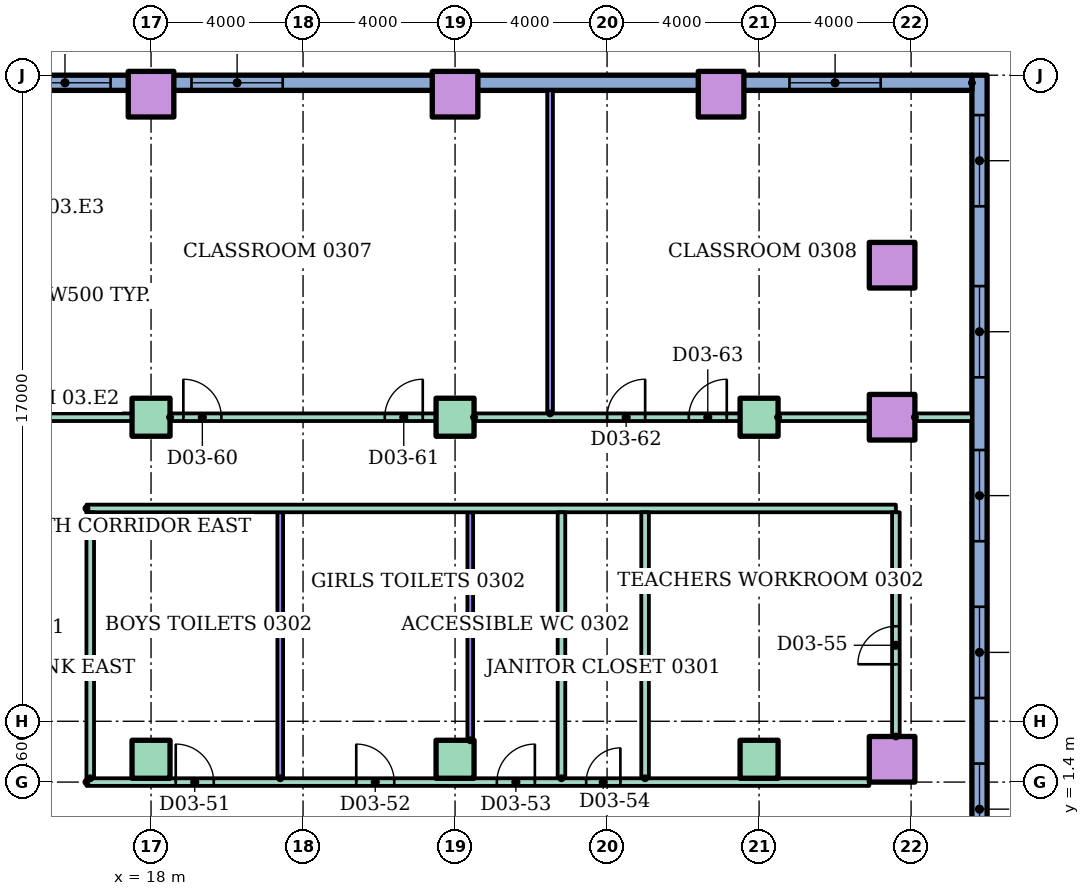
"""IFC4 building model, lengths in metres.
Left out: names, types, materials, properties, quantities, classifications, styles, units other than length and angle.
Written with IfcOpenShell. Run it as: python <this file> out.ifc"""

import sys

from ifc_helpers import new_model, si_unit, direction, frame, frame_2d, origin, origin_2d, place, context, subcontext, project, spatial, rectangle, hollow_rectangle, extrude, element, fill, save


model = new_model("IFC4")
c1 = context("Model", 3, precision=1e-05, world=origin(), true_north=direction((0.0, 1.0)))
c2 = subcontext(c1, "Body", "Model", "MODEL_VIEW")
j1 = project(units=[si_unit("LENGTHUNIT", "METRE"), si_unit("PLANEANGLEUNIT", "RADIAN")], contexts=[c1])
p1 = place(None, origin())
s1 = spatial("IfcSite", under=j1, at=p1, CompositionType="ELEMENT")
p2 = place(p1, origin())
s2 = spatial("IfcBuilding", under=s1, at=p2, CompositionType="ELEMENT")
p3 = place(p2, frame((0.0, 0.0, 14.0)))
s3 = spatial("IfcBuildingStorey", under=s2, at=p3, CompositionType="ELEMENT", Elevation=14.0)
for number, where in (
    (1, (18.0, 2.0, 0.0)),
    (2, (26.0, 2.0, 0.0)),
    (3, (34.0, 2.0, 0.0)),
):
    element("IfcColumn", number, at=place(p3, frame(where)), inside=s3, PredefinedType="COLUMN", context=c2, shape_type="SweptSolid", body=[
        extrude(rectangle(XDim=1.0, YDim=1.0, at=origin_2d()), origin(), (0.0, 0.0, 1.0), 4.0),
    ])
p4 = place(p3, frame((37.5, 2.0, 0.0)))
e4 = element("IfcColumn", 4, at=p4, inside=s3, PredefinedType="COLUMN", context=c2, shape_type="SweptSolid", body=[
    extrude(hollow_rectangle(XDim=1.2, YDim=1.2, WallThickness=0.06, at=origin_2d()), origin(), (0.0, 0.0, 1.0), 4.0),
])
for number, where in (
    (5, (18.0, 11.0, 0.0)),
    (6, (26.0, 11.0, 0.0)),
    (7, (34.0, 11.0, 0.0)),
):
    element("IfcColumn", number, at=place(p3, frame(where)), inside=s3, PredefinedType="COLUMN", context=c2, shape_type="SweptSolid", body=[
        extrude(rectangle(XDim=1.0, YDim=1.0, at=origin_2d()), origin(), (0.0, 0.0, 1.0), 4.0),
    ])
for number, where in (
    (8, (37.5, 11.0, 0.0)),
    (9, (37.5, 15.0, 0.0)),
    (10, (18.0, 19.5, 0.0)),
    (11, (26.0, 19.5, 0.0)),
    (12, (33.0, 19.5, 0.0)),
):
    element("IfcColumn", number, at=place(p3, frame(where)), inside=s3, PredefinedType="COLUMN", context=c2, shape_type="SweptSolid", body=[
        extrude(hollow_rectangle(XDim=1.2, YDim=1.2, WallThickness=0.06, at=origin_2d()), origin(), (0.0, 0.0, 1.0), 4.0),
    ])
p5 = place(p3, frame((39.8, -50.0, 0.0), z_axis=(0.0, 0.0, 1.0), x_axis=(0.0, 1.0, 0.0)))
e13 = element("IfcWall", 13, at=p5, inside=s3, PredefinedType="STANDARD", context=c2, shape_type="SweptSolid", body=[
    extrude(rectangle(XDim=70.0, YDim=0.4, at=frame_2d((35.0, 0.0))), origin(), (0.0, 0.0, 1.0), 3.7),
])
p6 = place(p5, frame((0.75, 0.0, 0.9)))
e14 = element("IfcOpeningElement", 14, at=p6, cuts=e13, PredefinedType="OPENING", context=c2, shape_type="SweptSolid", body=[
    extrude(rectangle(XDim=2.4, YDim=2.1, at=frame_2d((1.2, 1.05))), frame((0.0, 0.21, 0.0), z_axis=(0.0, -1.0, 0.0), x_axis=(1.0, 0.0, 0.0)), (0.0, 0.0, 1.0), 0.42),
])
p7 = place(p5, frame((28.863, 0.0, 0.9)))
e15 = element("IfcOpeningElement", 15, at=p7, cuts=e13, PredefinedType="OPENING", context=c2, shape_type="SweptSolid", body=[
    extrude(rectangle(XDim=2.4, YDim=2.1, at=frame_2d((1.2, 1.05))), frame((0.0, 0.21, 0.0), z_axis=(0.0, -1.0, 0.0), x_axis=(1.0, 0.0, 0.0)), (0.0, 0.0, 1.0), 0.42),
])
p8 = place(p5, frame((32.988, 0.0, 0.9)))
e16 = element("IfcOpeningElement", 16, at=p8, cuts=e13, PredefinedType="OPENING", context=c2, shape_type="SweptSolid", body=[
    extrude(rectangle(XDim=2.4, YDim=2.1, at=frame_2d((1.2, 1.05))), frame((0.0, 0.21, 0.0), z_axis=(0.0, -1.0, 0.0), x_axis=(1.0, 0.0, 0.0)), (0.0, 0.0, 1.0), 0.42),
])
p9 = place(p5, frame((37.113, 0.0, 0.9)))
e17 = element("IfcOpeningElement", 17, at=p9, cuts=e13, PredefinedType="OPENING", context=c2, shape_type="SweptSolid", body=[
    extrude(rectangle(XDim=2.4, YDim=2.1, at=frame_2d((1.2, 1.05))), frame((0.0, 0.21, 0.0), z_axis=(0.0, -1.0, 0.0), x_axis=(1.0, 0.0, 0.0)), (0.0, 0.0, 1.0), 0.42),
])
p10 = place(p5, frame((41.238, 0.0, 0.9)))
e18 = element("IfcOpeningElement", 18, at=p10, cuts=e13, PredefinedType="OPENING", context=c2, shape_type="SweptSolid", body=[
    extrude(rectangle(XDim=2.4, YDim=2.1, at=frame_2d((1.2, 1.05))), frame((0.0, 0.21, 0.0), z_axis=(0.0, -1.0, 0.0), x_axis=(1.0, 0.0, 0.0)), (0.0, 0.0, 1.0), 0.42),
])
p11 = place(p5, frame((45.363, 0.0, 0.9)))
e19 = element("IfcOpeningElement", 19, at=p11, cuts=e13, PredefinedType="OPENING", context=c2, shape_type="SweptSolid", body=[
    extrude(rectangle(XDim=2.4, YDim=2.1, at=frame_2d((1.2, 1.05))), frame((0.0, 0.21, 0.0), z_axis=(0.0, -1.0, 0.0), x_axis=(1.0, 0.0, 0.0)), (0.0, 0.0, 1.0), 0.42),
])
p12 = place(p5, frame((49.488, 0.0, 0.9)))
e20 = element("IfcOpeningElement", 20, at=p12, cuts=e13, PredefinedType="OPENING", context=c2, shape_type="SweptSolid", body=[
    extrude(rectangle(XDim=2.4, YDim=2.1, at=frame_2d((1.2, 1.05))), frame((0.0, 0.21, 0.0), z_axis=(0.0, -1.0, 0.0), x_axis=(1.0, 0.0, 0.0)), (0.0, 0.0, 1.0), 0.42),
])
p13 = place(p5, frame((53.613, 0.0, 0.9)))
e21 = element("IfcOpeningElement", 21, at=p13, cuts=e13, PredefinedType="OPENING", context=c2, shape_type="SweptSolid", body=[
    extrude(rectangle(XDim=2.4, YDim=2.1, at=frame_2d((1.2, 1.05))), frame((0.0, 0.21, 0.0), z_axis=(0.0, -1.0, 0.0), x_axis=(1.0, 0.0, 0.0)), (0.0, 0.0, 1.0), 0.42),
])
p14 = place(p5, frame((57.738, 0.0, 0.9)))
e22 = element("IfcOpeningElement", 22, at=p14, cuts=e13, PredefinedType="OPENING", context=c2, shape_type="SweptSolid", body=[
    extrude(rectangle(XDim=2.4, YDim=2.1, at=frame_2d((1.2, 1.05))), frame((0.0, 0.21, 0.0), z_axis=(0.0, -1.0, 0.0), x_axis=(1.0, 0.0, 0.0)), (0.0, 0.0, 1.0), 0.42),
])
p15 = place(p5, frame((62.05, 0.0, 0.9)))
e23 = element("IfcOpeningElement", 23, at=p15, cuts=e13, PredefinedType="OPENING", context=c2, shape_type="SweptSolid", body=[
    extrude(rectangle(XDim=2.4, YDim=2.1, at=frame_2d((1.2, 1.05))), frame((0.0, 0.21, 0.0), z_axis=(0.0, -1.0, 0.0), x_axis=(1.0, 0.0, 0.0)), (0.0, 0.0, 1.0), 0.42),
])
p16 = place(p5, frame((66.55, 0.0, 0.9)))
e24 = element("IfcOpeningElement", 24, at=p16, cuts=e13, PredefinedType="OPENING", context=c2, shape_type="SweptSolid", body=[
    extrude(rectangle(XDim=2.4, YDim=2.1, at=frame_2d((1.2, 1.05))), frame((0.0, 0.21, 0.0), z_axis=(0.0, -1.0, 0.0), x_axis=(1.0, 0.0, 0.0)), (0.0, 0.0, 1.0), 0.42),
])
p17 = place(p3, frame((39.6, 19.8, 0.0), z_axis=(0.0, 0.0, 1.0), x_axis=(-1.0, 0.0, 0.0)))
e25 = element("IfcWall", 25, at=p17, inside=s3, PredefinedType="STANDARD", context=c2, shape_type="SweptSolid", body=[
    extrude(rectangle(XDim=25.6, YDim=0.4, at=frame_2d((12.8, 0.0))), origin(), (0.0, 0.0, 1.0), 3.7),
])
p18 = place(p17, frame((2.4, 0.0, 0.9)))
e26 = element("IfcOpeningElement", 26, at=p18, cuts=e25, PredefinedType="OPENING", context=c2, shape_type="SweptSolid", body=[
    extrude(rectangle(XDim=2.4, YDim=2.1, at=frame_2d((1.2, 1.05))), frame((0.0, 0.21, 0.0), z_axis=(0.0, -1.0, 0.0), x_axis=(1.0, 0.0, 0.0)), (0.0, 0.0, 1.0), 0.42),
])
p19 = place(p17, frame((18.135, 0.0, 0.9)))
e27 = element("IfcOpeningElement", 27, at=p19, cuts=e25, PredefinedType="OPENING", context=c2, shape_type="SweptSolid", body=[
    extrude(rectangle(XDim=2.4, YDim=2.1, at=frame_2d((1.2, 1.05))), frame((0.0, 0.21, 0.0), z_axis=(0.0, -1.0, 0.0), x_axis=(1.0, 0.0, 0.0)), (0.0, 0.0, 1.0), 0.42),
])
p20 = place(p17, frame((22.665, 0.0, 0.9)))
e28 = element("IfcOpeningElement", 28, at=p20, cuts=e25, PredefinedType="OPENING", context=c2, shape_type="SweptSolid", body=[
    extrude(rectangle(XDim=2.4, YDim=2.1, at=frame_2d((1.2, 1.05))), frame((0.0, 0.21, 0.0), z_axis=(0.0, -1.0, 0.0), x_axis=(1.0, 0.0, 0.0)), (0.0, 0.0, 1.0), 0.42),
])
p21 = place(p3, frame((16.3, 1.4, 0.0)))
e29 = element("IfcWall", 29, at=p21, inside=s3, PredefinedType="PARTITIONING", context=c2, shape_type="SweptSolid", body=[
    extrude(rectangle(XDim=20.6, YDim=0.2, at=frame_2d((10.3, 0.0))), origin(), (0.0, 0.0, 1.0), 3.7),
])
p22 = place(p21, frame((2.35, 0.0, 0.0)))
e30 = element("IfcOpeningElement", 30, at=p22, cuts=e29, PredefinedType="OPENING", context=c2, shape_type="SweptSolid", body=[
    extrude(rectangle(XDim=1.0, YDim=2.1, at=frame_2d((0.5, 1.05))), frame((0.0, 0.11, 0.0), z_axis=(0.0, -1.0, 0.0), x_axis=(1.0, 0.0, 0.0)), (0.0, 0.0, 1.0), 0.22),
])
p23 = place(p21, frame((7.1, 0.0, 0.0)))
e31 = element("IfcOpeningElement", 31, at=p23, cuts=e29, PredefinedType="OPENING", context=c2, shape_type="SweptSolid", body=[
    extrude(rectangle(XDim=1.0, YDim=2.1, at=frame_2d((0.5, 1.05))), frame((0.0, 0.11, 0.0), z_axis=(0.0, -1.0, 0.0), x_axis=(1.0, 0.0, 0.0)), (0.0, 0.0, 1.0), 0.22),
])
p24 = place(p21, frame((10.8, 0.0, 0.0)))
e32 = element("IfcOpeningElement", 32, at=p24, cuts=e29, PredefinedType="OPENING", context=c2, shape_type="SweptSolid", body=[
    extrude(rectangle(XDim=1.0, YDim=2.1, at=frame_2d((0.5, 1.05))), frame((0.0, 0.11, 0.0), z_axis=(0.0, -1.0, 0.0), x_axis=(1.0, 0.0, 0.0)), (0.0, 0.0, 1.0), 0.22),
])
p25 = place(p21, frame((13.15, 0.0, 0.0)))
e33 = element("IfcOpeningElement", 33, at=p25, cuts=e29, PredefinedType="OPENING", context=c2, shape_type="SweptSolid", body=[
    extrude(rectangle(XDim=0.9, YDim=2.1, at=frame_2d((0.45, 1.05))), frame((0.0, 0.11, 0.0), z_axis=(0.0, -1.0, 0.0), x_axis=(1.0, 0.0, 0.0)), (0.0, 0.0, 1.0), 0.22),
])
p26 = place(p3, frame((16.3, 8.6, 0.0)))
e34 = element("IfcWall", 34, at=p26, inside=s3, PredefinedType="PARTITIONING", context=c2, shape_type="SweptSolid", body=[
    extrude(rectangle(XDim=21.3, YDim=0.2, at=frame_2d((10.65, 0.0))), origin(), (0.0, 0.0, 1.0), 3.7),
])
p27 = place(p3, frame((14.0, 11.0, 0.0)))
e35 = element("IfcWall", 35, at=p27, inside=s3, PredefinedType="PARTITIONING", context=c2, shape_type="SweptSolid", body=[
    extrude(rectangle(XDim=3.5, YDim=0.2, at=frame_2d((1.75, 0.0))), origin(), (0.0, 0.0, 1.0), 3.7),
])
p28 = place(p3, frame((18.5, 11.0, 0.0)))
e36 = element("IfcWall", 36, at=p28, inside=s3, PredefinedType="PARTITIONING", context=c2, shape_type="SweptSolid", body=[
    extrude(rectangle(XDim=7.0, YDim=0.2, at=frame_2d((3.5, 0.0))), origin(), (0.0, 0.0, 1.0), 3.7),
])
p29 = place(p28, frame((0.35, 0.0, 0.0)))
e37 = element("IfcOpeningElement", 37, at=p29, cuts=e36, PredefinedType="OPENING", context=c2, shape_type="SweptSolid", body=[
    extrude(rectangle(XDim=1.0, YDim=2.1, at=frame_2d((0.5, 1.05))), frame((0.0, 0.11, 0.0), z_axis=(0.0, -1.0, 0.0), x_axis=(1.0, 0.0, 0.0)), (0.0, 0.0, 1.0), 0.22),
])
p30 = place(p28, frame((5.65, 0.0, 0.0)))
e38 = element("IfcOpeningElement", 38, at=p30, cuts=e36, PredefinedType="OPENING", context=c2, shape_type="SweptSolid", body=[
    extrude(rectangle(XDim=1.0, YDim=2.1, at=frame_2d((0.5, 1.05))), frame((0.0, 0.11, 0.0), z_axis=(0.0, -1.0, 0.0), x_axis=(1.0, 0.0, 0.0)), (0.0, 0.0, 1.0), 0.22),
])
p31 = place(p3, frame((26.5, 11.0, 0.0)))
e39 = element("IfcWall", 39, at=p31, inside=s3, PredefinedType="PARTITIONING", context=c2, shape_type="SweptSolid", body=[
    extrude(rectangle(XDim=7.0, YDim=0.2, at=frame_2d((3.5, 0.0))), origin(), (0.0, 0.0, 1.0), 3.7),
])
p32 = place(p31, frame((3.502, 0.0, 0.0)))
e40 = element("IfcOpeningElement", 40, at=p32, cuts=e39, PredefinedType="OPENING", context=c2, shape_type="SweptSolid", body=[
    extrude(rectangle(XDim=1.0, YDim=2.1, at=frame_2d((0.5, 1.05))), frame((0.0, 0.11, 0.0), z_axis=(0.0, -1.0, 0.0), x_axis=(1.0, 0.0, 0.0)), (0.0, 0.0, 1.0), 0.22),
])
p33 = place(p31, frame((5.65, 0.0, 0.0)))
e41 = element("IfcOpeningElement", 41, at=p33, cuts=e39, PredefinedType="OPENING", context=c2, shape_type="SweptSolid", body=[
    extrude(rectangle(XDim=1.0, YDim=2.1, at=frame_2d((0.5, 1.05))), frame((0.0, 0.11, 0.0), z_axis=(0.0, -1.0, 0.0), x_axis=(1.0, 0.0, 0.0)), (0.0, 0.0, 1.0), 0.22),
])
p34 = place(p3, frame((34.5, 11.0, 0.0)))
e42 = element("IfcWall", 42, at=p34, inside=s3, PredefinedType="PARTITIONING", context=c2, shape_type="SweptSolid", body=[
    extrude(rectangle(XDim=2.4, YDim=0.2, at=frame_2d((1.2, 0.0))), origin(), (0.0, 0.0, 1.0), 3.7),
])
p35 = place(p3, frame((38.1, 11.0, 0.0)))
e43 = element("IfcWall", 43, at=p35, inside=s3, PredefinedType="PARTITIONING", context=c2, shape_type="SweptSolid", body=[
    extrude(rectangle(XDim=1.5, YDim=0.2, at=frame_2d((0.75, 0.0))), origin(), (0.0, 0.0, 1.0), 3.7),
])
p36 = place(p3, frame((16.4, 1.5, 0.0), z_axis=(0.0, 0.0, 1.0), x_axis=(0.0, 1.0, 0.0)))
e44 = element("IfcWall", 44, at=p36, inside=s3, PredefinedType="PARTITIONING", context=c2, shape_type="SweptSolid", body=[
    extrude(rectangle(XDim=7.0, YDim=0.2, at=frame_2d((3.5, 0.0))), origin(), (0.0, 0.0, 1.0), 3.7),
])
p37 = place(p3, frame((21.4, 1.5, 0.0), z_axis=(0.0, 0.0, 1.0), x_axis=(0.0, 1.0, 0.0)))
e45 = element("IfcWall", 45, at=p37, inside=s3, PredefinedType="PARTITIONING", context=c2, shape_type="SweptSolid", body=[
    extrude(rectangle(XDim=7.0, YDim=0.15, at=frame_2d((3.5, 0.0))), origin(), (0.0, 0.0, 1.0), 3.7),
])
p38 = place(p3, frame((26.4, 2.5, 0.0), z_axis=(0.0, 0.0, 1.0), x_axis=(0.0, 1.0, 0.0)))
e46 = element("IfcWall", 46, at=p38, inside=s3, PredefinedType="PARTITIONING", context=c2, shape_type="SweptSolid", body=[
    extrude(rectangle(XDim=6.0, YDim=0.15, at=frame_2d((3.0, 0.0))), origin(), (0.0, 0.0, 1.0), 3.7),
])
p39 = place(p3, frame((28.5, 11.1, 0.0), z_axis=(0.0, 0.0, 1.0), x_axis=(0.0, 1.0, 0.0)))
e47 = element("IfcWall", 47, at=p39, inside=s3, PredefinedType="PARTITIONING", context=c2, shape_type="SweptSolid", body=[
    extrude(rectangle(XDim=8.5, YDim=0.15, at=frame_2d((4.25, 0.0))), origin(), (0.0, 0.0, 1.0), 3.7),
])
for number, where, z_axis, x_axis in (
    (48, (28.8, 1.5, 0.0), (0.0, 0.0, 1.0), (0.0, 1.0, 0.0)),
    (49, (31.0, 1.5, 0.0), (0.0, 0.0, 1.0), (0.0, 1.0, 0.0)),
):
    element("IfcWall", number, at=place(p3, frame(where, z_axis=z_axis, x_axis=x_axis)), inside=s3, PredefinedType="PARTITIONING", context=c2, shape_type="SweptSolid", body=[
        extrude(rectangle(XDim=7.0, YDim=0.2, at=frame_2d((3.5, 0.0))), origin(), (0.0, 0.0, 1.0), 3.7),
    ])
p40 = place(p3, frame((37.6, 2.6, 0.0), z_axis=(0.0, 0.0, 1.0), x_axis=(0.0, 1.0, 0.0)))
e50 = element("IfcWall", 50, at=p40, inside=s3, PredefinedType="PARTITIONING", context=c2, shape_type="SweptSolid", body=[
    extrude(rectangle(XDim=5.9, YDim=0.2, at=frame_2d((2.95, 0.0))), origin(), (0.0, 0.0, 1.0), 3.7),
])
p41 = place(p40, frame((1.9, 0.0, 0.0)))
e51 = element("IfcOpeningElement", 51, at=p41, cuts=e50, PredefinedType="OPENING", context=c2, shape_type="SweptSolid", body=[
    extrude(rectangle(XDim=1.0, YDim=2.1, at=frame_2d((0.5, 1.05))), frame((0.0, 0.11, 0.0), z_axis=(0.0, -1.0, 0.0), x_axis=(1.0, 0.0, 0.0)), (0.0, 0.0, 1.0), 0.22),
])
p42 = place(p12, origin())
e52 = element("IfcWindow", 52, at=p42, inside=s3, PartitioningType="SINGLE_PANEL", PredefinedType="WINDOW", context=c2, shape_type="SweptSolid", body=[
    extrude(rectangle(XDim=2.4, YDim=2.1, at=frame_2d((1.2, 1.05))), frame((0.0, 0.03, 0.0), z_axis=(0.0, -1.0, 0.0), x_axis=(1.0, 0.0, 0.0)), (0.0, 0.0, 1.0), 0.06),
])
fill(e20, e52)
p43 = place(p13, origin())
e53 = element("IfcWindow", 53, at=p43, inside=s3, PartitioningType="SINGLE_PANEL", PredefinedType="WINDOW", context=c2, shape_type="SweptSolid", body=[
    extrude(rectangle(XDim=2.4, YDim=2.1, at=frame_2d((1.2, 1.05))), frame((0.0, 0.03, 0.0), z_axis=(0.0, -1.0, 0.0), x_axis=(1.0, 0.0, 0.0)), (0.0, 0.0, 1.0), 0.06),
])
fill(e21, e53)
p44 = place(p14, origin())
e54 = element("IfcWindow", 54, at=p44, inside=s3, PartitioningType="SINGLE_PANEL", PredefinedType="WINDOW", context=c2, shape_type="SweptSolid", body=[
    extrude(rectangle(XDim=2.4, YDim=2.1, at=frame_2d((1.2, 1.05))), frame((0.0, 0.03, 0.0), z_axis=(0.0, -1.0, 0.0), x_axis=(1.0, 0.0, 0.0)), (0.0, 0.0, 1.0), 0.06),
])
fill(e22, e54)
p45 = place(p15, origin())
e55 = element("IfcWindow", 55, at=p45, inside=s3, PartitioningType="SINGLE_PANEL", PredefinedType="WINDOW", context=c2, shape_type="SweptSolid", body=[
    extrude(rectangle(XDim=2.4, YDim=2.1, at=frame_2d((1.2, 1.05))), frame((0.0, 0.03, 0.0), z_axis=(0.0, -1.0, 0.0), x_axis=(1.0, 0.0, 0.0)), (0.0, 0.0, 1.0), 0.06),
])
fill(e23, e55)
p46 = place(p16, origin())
e56 = element("IfcWindow", 56, at=p46, inside=s3, PartitioningType="SINGLE_PANEL", PredefinedType="WINDOW", context=c2, shape_type="SweptSolid", body=[
    extrude(rectangle(XDim=2.4, YDim=2.1, at=frame_2d((1.2, 1.05))), frame((0.0, 0.03, 0.0), z_axis=(0.0, -1.0, 0.0), x_axis=(1.0, 0.0, 0.0)), (0.0, 0.0, 1.0), 0.06),
])
fill(e24, e56)
p47 = place(p18, origin())
e57 = element("IfcWindow", 57, at=p47, inside=s3, PartitioningType="SINGLE_PANEL", PredefinedType="WINDOW", context=c2, shape_type="SweptSolid", body=[
    extrude(rectangle(XDim=2.4, YDim=2.1, at=frame_2d((1.2, 1.05))), frame((0.0, 0.03, 0.0), z_axis=(0.0, -1.0, 0.0), x_axis=(1.0, 0.0, 0.0)), (0.0, 0.0, 1.0), 0.06),
])
fill(e26, e57)
p48 = place(p19, origin())
e58 = element("IfcWindow", 58, at=p48, inside=s3, PartitioningType="SINGLE_PANEL", PredefinedType="WINDOW", context=c2, shape_type="SweptSolid", body=[
    extrude(rectangle(XDim=2.4, YDim=2.1, at=frame_2d((1.2, 1.05))), frame((0.0, 0.03, 0.0), z_axis=(0.0, -1.0, 0.0), x_axis=(1.0, 0.0, 0.0)), (0.0, 0.0, 1.0), 0.06),
])
fill(e27, e58)
p49 = place(p20, origin())
e59 = element("IfcWindow", 59, at=p49, inside=s3, PartitioningType="SINGLE_PANEL", PredefinedType="WINDOW", context=c2, shape_type="SweptSolid", body=[
    extrude(rectangle(XDim=2.4, YDim=2.1, at=frame_2d((1.2, 1.05))), frame((0.0, 0.03, 0.0), z_axis=(0.0, -1.0, 0.0), x_axis=(1.0, 0.0, 0.0)), (0.0, 0.0, 1.0), 0.06),
])
fill(e28, e59)
p50 = place(p22, origin())
e60 = element("IfcDoor", 60, at=p50, inside=s3, OperationType="SINGLE_SWING_LEFT", PredefinedType="DOOR", context=c2, shape_type="SweptSolid", body=[
    extrude(rectangle(XDim=1.0, YDim=2.1, at=frame_2d((0.5, 1.05))), frame((0.0, 0.025, 0.0), z_axis=(0.0, -1.0, 0.0), x_axis=(1.0, 0.0, 0.0)), (0.0, 0.0, 1.0), 0.05),
])
fill(e30, e60)
p51 = place(p23, origin())
e61 = element("IfcDoor", 61, at=p51, inside=s3, OperationType="SINGLE_SWING_LEFT", PredefinedType="DOOR", context=c2, shape_type="SweptSolid", body=[
    extrude(rectangle(XDim=1.0, YDim=2.1, at=frame_2d((0.5, 1.05))), frame((0.0, 0.025, 0.0), z_axis=(0.0, -1.0, 0.0), x_axis=(1.0, 0.0, 0.0)), (0.0, 0.0, 1.0), 0.05),
])
fill(e31, e61)
p52 = place(p24, origin())
e62 = element("IfcDoor", 62, at=p52, inside=s3, OperationType="SINGLE_SWING_RIGHT", PredefinedType="DOOR", context=c2, shape_type="SweptSolid", body=[
    extrude(rectangle(XDim=1.0, YDim=2.1, at=frame_2d((0.5, 1.05))), frame((0.0, 0.025, 0.0), z_axis=(0.0, -1.0, 0.0), x_axis=(1.0, 0.0, 0.0)), (0.0, 0.0, 1.0), 0.05),
])
fill(e32, e62)
p53 = place(p25, origin())
e63 = element("IfcDoor", 63, at=p53, inside=s3, OperationType="SINGLE_SWING_RIGHT", PredefinedType="DOOR", context=c2, shape_type="SweptSolid", body=[
    extrude(rectangle(XDim=0.9, YDim=2.1, at=frame_2d((0.45, 1.05))), frame((0.0, 0.025, 0.0), z_axis=(0.0, -1.0, 0.0), x_axis=(1.0, 0.0, 0.0)), (0.0, 0.0, 1.0), 0.05),
])
fill(e33, e63)
p54 = place(p41, origin())
e64 = element("IfcDoor", 64, at=p54, inside=s3, OperationType="SINGLE_SWING_LEFT", PredefinedType="DOOR", context=c2, shape_type="SweptSolid", body=[
    extrude(rectangle(XDim=1.0, YDim=2.1, at=frame_2d((0.5, 1.05))), frame((0.0, 0.025, 0.0), z_axis=(0.0, -1.0, 0.0), x_axis=(1.0, 0.0, 0.0)), (0.0, 0.0, 1.0), 0.05),
])
fill(e51, e64)
p55 = place(p29, origin())
e65 = element("IfcDoor", 65, at=p55, inside=s3, OperationType="SINGLE_SWING_LEFT", PredefinedType="DOOR", context=c2, shape_type="SweptSolid", body=[
    extrude(rectangle(XDim=1.0, YDim=2.1, at=frame_2d((0.5, 1.05))), frame((0.0, 0.025, 0.0), z_axis=(0.0, -1.0, 0.0), x_axis=(1.0, 0.0, 0.0)), (0.0, 0.0, 1.0), 0.05),
])
fill(e37, e65)
p56 = place(p30, origin())
e66 = element("IfcDoor", 66, at=p56, inside=s3, OperationType="SINGLE_SWING_RIGHT", PredefinedType="DOOR", context=c2, shape_type="SweptSolid", body=[
    extrude(rectangle(XDim=1.0, YDim=2.1, at=frame_2d((0.5, 1.05))), frame((0.0, 0.025, 0.0), z_axis=(0.0, -1.0, 0.0), x_axis=(1.0, 0.0, 0.0)), (0.0, 0.0, 1.0), 0.05),
])
fill(e38, e66)
p57 = place(p32, origin())
e67 = element("IfcDoor", 67, at=p57, inside=s3, OperationType="SINGLE_SWING_RIGHT", PredefinedType="DOOR", context=c2, shape_type="SweptSolid", body=[
    extrude(rectangle(XDim=1.0, YDim=2.1, at=frame_2d((0.5, 1.05))), frame((0.0, 0.025, 0.0), z_axis=(0.0, -1.0, 0.0), x_axis=(1.0, 0.0, 0.0)), (0.0, 0.0, 1.0), 0.05),
])
fill(e40, e67)
p58 = place(p33, origin())
e68 = element("IfcDoor", 68, at=p58, inside=s3, OperationType="SINGLE_SWING_RIGHT", PredefinedType="DOOR", context=c2, shape_type="SweptSolid", body=[
    extrude(rectangle(XDim=1.0, YDim=2.1, at=frame_2d((0.5, 1.05))), frame((0.0, 0.025, 0.0), z_axis=(0.0, -1.0, 0.0), x_axis=(1.0, 0.0, 0.0)), (0.0, 0.0, 1.0), 0.05),
])
fill(e41, e68)
save(model, sys.argv[1])
